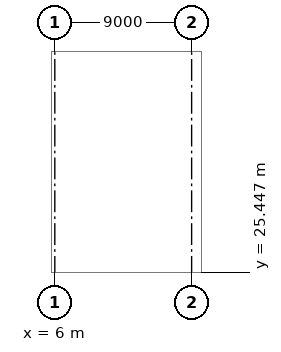
"""IFC4 building model, lengths in metres.
Left out: names, types, materials, properties, quantities, classifications, styles, units other than length and angle.
Written with IfcOpenShell. Run it as: python <this file> out.ifc"""

import sys

from ifc_helpers import new_model, si_unit, direction, frame, origin, origin_2d, place, context, subcontext, project, spatial, rectangle, extrude, element, save


model = new_model("IFC4")
c1 = context("Model", 3, precision=1e-05, world=origin(), true_north=direction((0.0, 1.0)))
c2 = subcontext(c1, "Body", "Model", "MODEL_VIEW")
j1 = project(units=[si_unit("LENGTHUNIT", "METRE"), si_unit("PLANEANGLEUNIT", "RADIAN")], contexts=[c1])
p1 = place(None, origin())
s1 = spatial("IfcSite", under=j1, at=p1, CompositionType="ELEMENT")
p2 = place(p1, origin())
s2 = spatial("IfcBuilding", under=s1, at=p2, CompositionType="ELEMENT")
p3 = place(p2, origin())
s3 = spatial("IfcBuildingStorey", under=s2, at=p3, CompositionType="ELEMENT", Elevation=0.0)
p4 = place(p3, frame((6.4, 33.7, -0.3), z_axis=(0.0, 0.0, 1.0), x_axis=(1.0, 0.0, 0.0)))
e1 = element("IfcColumn", 1, at=p4, inside=s3, PredefinedType="COLUMN", context=c2, shape_type="SweptSolid", body=[
    extrude(rectangle(XDim=0.8, YDim=1.2, at=origin_2d()), origin(), (0.0, 0.0, 1.0), 5.3),
])
p5 = place(p3, frame((15.0, 33.7, -0.3), z_axis=(0.0, 0.0, 1.0), x_axis=(1.0, 0.0, 0.0)))
e2 = element("IfcColumn", 2, at=p5, inside=s3, PredefinedType="COLUMN", context=c2, shape_type="SweptSolid", body=[
    extrude(rectangle(XDim=1.0, YDim=1.4, at=origin_2d()), origin(), (0.0, 0.0, 1.0), 5.3),
])
save(model, sys.argv[1])
